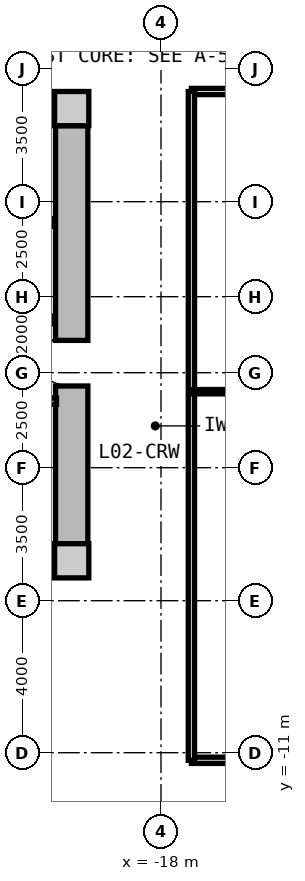
"""IFC4 building model, lengths in metres.
Left out: names, types, materials, properties, quantities, classifications, styles, units other than length and angle.
Written with IfcOpenShell. Run it as: python <this file> out.ifc"""

import sys

from ifc_helpers import new_model, si_unit, direction, frame, frame_2d, origin, origin_2d, place, context, subcontext, project, spatial, rectangle, extrude, source, transform, mapped, element, fill, save


model = new_model("IFC4")
c1 = context("Model", 3, precision=1e-05, world=origin(), true_north=direction((0.0, 1.0)))
c2 = subcontext(c1, "Body", "Model", "MODEL_VIEW")
j1 = project(units=[si_unit("LENGTHUNIT", "METRE"), si_unit("PLANEANGLEUNIT", "RADIAN")], contexts=[c1])
p1 = place(None, origin())
s1 = spatial("IfcSite", under=j1, at=p1, CompositionType="ELEMENT")
p2 = place(p1, origin())
s2 = spatial("IfcBuilding", under=s1, at=p2, CompositionType="ELEMENT")
p3 = place(p2, frame((0.0, 0.0, 8.4)))
s3 = spatial("IfcBuildingStorey", under=s2, at=p3, CompositionType="ELEMENT", Elevation=8.4)
m1 = source(origin(), c2, "Body", "SweptSolid", [
    extrude(rectangle(XDim=0.9, YDim=0.9, at=origin_2d()), origin(), (0.0, 0.0, 1.0), 4.2),
])
for number, where, z_axis, x_axis in (
    (1, (-20.35, -5.95, 0.0), (0.0, 0.0, 1.0), (1.0, 0.0, 0.0)),
    (2, (-20.35, 5.95, 0.0), (0.0, 0.0, 1.0), (1.0, 0.0, 0.0)),
):
    element("IfcColumn", number, at=place(p3, frame(where, z_axis=z_axis, x_axis=x_axis)), inside=s3, PredefinedType="COLUMN", context=c2, shape_type="MappedRepresentation", body=[
        mapped(m1, transform((0.0, 0.0, 0.0), x_axis=(1.0, 0.0, 0.0), y_axis=(0.0, 1.0, 0.0), z_axis=(0.0, 0.0, 1.0), scale=1.0)),
    ])
m2 = source(origin(), c2, "Body", "SweptSolid", [
    extrude(rectangle(XDim=14.4, YDim=0.85, at=frame_2d((7.2, 0.0))), origin(), (0.0, 0.0, 1.0), 3.88),
])
for number, where, z_axis, x_axis in (
    (3, (-35.2, 5.95, 0.0), (0.0, 0.0, 1.0), (1.0, 0.0, 0.0)),
    (4, (-20.8, -5.95, 0.0), (0.0, 0.0, 1.0), (-1.0, 0.0, 0.0)),
):
    element("IfcWall", number, at=place(p3, frame(where, z_axis=z_axis, x_axis=x_axis)), inside=s3, PredefinedType="SHEAR", context=c2, shape_type="MappedRepresentation", body=[
        mapped(m2, transform((0.0, 0.0, 0.0), x_axis=(1.0, 0.0, 0.0), y_axis=(0.0, 1.0, 0.0), z_axis=(0.0, 0.0, 1.0), scale=1.0)),
    ])
m3 = source(origin(), c2, "Body", "SweptSolid", [
    extrude(rectangle(XDim=11.0, YDim=0.85, at=frame_2d((5.5, 0.0))), origin(), (0.0, 0.0, 1.0), 3.88),
])
p4 = place(p3, frame((-20.35, 5.5, 0.0), z_axis=(0.0, 0.0, 1.0), x_axis=(0.0, -1.0, 0.0)))
e5 = element("IfcWall", 5, at=p4, inside=s3, PredefinedType="SHEAR", context=c2, shape_type="MappedRepresentation", body=[
    mapped(m3, transform((0.0, 0.0, 0.0), x_axis=(1.0, 0.0, 0.0), y_axis=(0.0, 1.0, 0.0), z_axis=(0.0, 0.0, 1.0), scale=1.0)),
])
p5 = place(p4, frame((5.65, 0.0, 0.0)))
e6 = element("IfcOpeningElement", 6, at=p5, cuts=e5, PredefinedType="OPENING", context=c2, shape_type="SweptSolid", body=[
    extrude(rectangle(XDim=1.2, YDim=2.15, at=frame_2d((0.6, 1.075))), frame((0.0, 0.435, 0.0), z_axis=(0.0, -1.0, 0.0), x_axis=(1.0, 0.0, 0.0)), (0.0, 0.0, 1.0), 0.87),
])
m4 = source(origin(), c2, "Body", "SweptSolid", [
    extrude(rectangle(XDim=3.2, YDim=0.2, at=frame_2d((1.6, 0.0))), origin(), (0.0, 0.0, 1.0), 3.865),
])
p6 = place(p3, frame((-24.0, 2.95, 0.0), z_axis=(0.0, 0.0, 1.0), x_axis=(1.0, 0.0, 0.0)))
e7 = element("IfcWall", 7, at=p6, inside=s3, PredefinedType="PARTITIONING", context=c2, shape_type="MappedRepresentation", body=[
    mapped(m4, transform((0.0, 0.0, 0.0), x_axis=(1.0, 0.0, 0.0), y_axis=(0.0, 1.0, 0.0), z_axis=(0.0, 0.0, 1.0), scale=1.0)),
])
m5 = source(origin(), c2, "Body", "SweptSolid", [
    extrude(rectangle(XDim=6.66, YDim=0.21, at=frame_2d((3.33, 0.0))), origin(), (0.0, 0.0, 1.0), 3.865),
])
p7 = place(p3, frame((-27.46, 0.39, 0.0), z_axis=(0.0, 0.0, 1.0), x_axis=(1.0, 0.0, 0.0)))
e8 = element("IfcWall", 8, at=p7, inside=s3, PredefinedType="PARTITIONING", context=c2, shape_type="MappedRepresentation", body=[
    mapped(m5, transform((0.0, 0.0, 0.0), x_axis=(1.0, 0.0, 0.0), y_axis=(0.0, 1.0, 0.0), z_axis=(0.0, 0.0, 1.0), scale=1.0)),
])
p8 = place(p7, frame((1.0, 0.0, 0.0)))
e9 = element("IfcOpeningElement", 9, at=p8, cuts=e8, PredefinedType="OPENING", context=c2, shape_type="SweptSolid", body=[
    extrude(rectangle(XDim=1.2, YDim=2.15, at=frame_2d((0.6, 1.075))), frame((0.0, 0.115, 0.0), z_axis=(0.0, -1.0, 0.0), x_axis=(1.0, 0.0, 0.0)), (0.0, 0.0, 1.0), 0.23),
])
m6 = source(origin(), c2, "Body", "SweptSolid", [
    extrude(rectangle(XDim=2.7, YDim=0.165, at=frame_2d((1.35, 0.0))), origin(), (0.0, 0.0, 1.0), 3.865),
])
p9 = place(p3, frame((-23.45, -1.75, 0.0), z_axis=(0.0, 0.0, 1.0), x_axis=(1.0, 0.0, 0.0)))
e10 = element("IfcWall", 10, at=p9, inside=s3, PredefinedType="PARTITIONING", context=c2, shape_type="MappedRepresentation", body=[
    mapped(m6, transform((0.0, 0.0, 0.0), x_axis=(1.0, 0.0, 0.0), y_axis=(0.0, 1.0, 0.0), z_axis=(0.0, 0.0, 1.0), scale=1.0)),
])
p10 = place(p9, frame((0.222, 0.0, 0.0)))
e11 = element("IfcOpeningElement", 11, at=p10, cuts=e10, PredefinedType="OPENING", context=c2, shape_type="SweptSolid", body=[
    extrude(rectangle(XDim=0.925, YDim=2.1, at=frame_2d((0.462, 1.05))), frame((0.0, 0.093, 0.0), z_axis=(0.0, -1.0, 0.0), x_axis=(1.0, 0.0, 0.0)), (0.0, 0.0, 1.0), 0.185),
])
p11 = place(p9, frame((1.522, 0.0, 0.0)))
e12 = element("IfcOpeningElement", 12, at=p11, cuts=e10, PredefinedType="OPENING", context=c2, shape_type="SweptSolid", body=[
    extrude(rectangle(XDim=0.925, YDim=2.1, at=frame_2d((0.462, 1.05))), frame((0.0, 0.093, 0.0), z_axis=(0.0, -1.0, 0.0), x_axis=(1.0, 0.0, 0.0)), (0.0, 0.0, 1.0), 0.185),
])
m7 = source(origin(), c2, "Body", "SweptSolid", [
    extrude(rectangle(XDim=34.4, YDim=0.165, at=frame_2d((17.2, 0.0))), origin(), (0.0, 0.0, 1.0), 3.865),
])
p12 = place(p3, frame((-17.2, -11.2, 0.0), z_axis=(0.0, 0.0, 1.0), x_axis=(1.0, 0.0, 0.0)))
e13 = element("IfcWall", 13, at=p12, inside=s3, PredefinedType="PARTITIONING", context=c2, shape_type="MappedRepresentation", body=[
    mapped(m7, transform((0.0, 0.0, 0.0), x_axis=(1.0, 0.0, 0.0), y_axis=(0.0, 1.0, 0.0), z_axis=(0.0, 0.0, 1.0), scale=1.0)),
])
p13 = place(p12, frame((4.2, 0.0, 0.0)))
e14 = element("IfcOpeningElement", 14, at=p13, cuts=e13, PredefinedType="OPENING", context=c2, shape_type="SweptSolid", body=[
    extrude(rectangle(XDim=1.25, YDim=2.2, at=frame_2d((0.625, 1.1))), frame((0.0, 0.093, 0.0), z_axis=(0.0, -1.0, 0.0), x_axis=(1.0, 0.0, 0.0)), (0.0, 0.0, 1.0), 0.185),
])
p14 = place(p12, frame((16.1, 0.0, 0.0)))
e15 = element("IfcOpeningElement", 15, at=p14, cuts=e13, PredefinedType="OPENING", context=c2, shape_type="SweptSolid", body=[
    extrude(rectangle(XDim=2.2, YDim=2.4, at=frame_2d((1.1, 1.2))), frame((0.0, 0.093, 0.0), z_axis=(0.0, -1.0, 0.0), x_axis=(1.0, 0.0, 0.0)), (0.0, 0.0, 1.0), 0.185),
])
p15 = place(p12, frame((27.5, 0.0, 0.0)))
e16 = element("IfcOpeningElement", 16, at=p15, cuts=e13, PredefinedType="OPENING", context=c2, shape_type="SweptSolid", body=[
    extrude(rectangle(XDim=1.25, YDim=2.2, at=frame_2d((0.625, 1.1))), frame((0.0, 0.093, 0.0), z_axis=(0.0, -1.0, 0.0), x_axis=(1.0, 0.0, 0.0)), (0.0, 0.0, 1.0), 0.185),
])
p16 = place(p3, frame((-17.2, 6.4, 0.0), z_axis=(0.0, 0.0, 1.0), x_axis=(1.0, 0.0, 0.0)))
e17 = element("IfcWall", 17, at=p16, inside=s3, PredefinedType="PARTITIONING", context=c2, shape_type="MappedRepresentation", body=[
    mapped(m7, transform((0.0, 0.0, 0.0), x_axis=(1.0, 0.0, 0.0), y_axis=(0.0, 1.0, 0.0), z_axis=(0.0, 0.0, 1.0), scale=1.0)),
])
p17 = place(p16, frame((4.2, 0.0, 0.0)))
e18 = element("IfcOpeningElement", 18, at=p17, cuts=e17, PredefinedType="OPENING", context=c2, shape_type="SweptSolid", body=[
    extrude(rectangle(XDim=1.25, YDim=2.2, at=frame_2d((0.625, 1.1))), frame((0.0, 0.093, 0.0), z_axis=(0.0, -1.0, 0.0), x_axis=(1.0, 0.0, 0.0)), (0.0, 0.0, 1.0), 0.185),
])
p18 = place(p16, frame((25.5, 0.0, 0.0)))
e19 = element("IfcOpeningElement", 19, at=p18, cuts=e17, PredefinedType="OPENING", context=c2, shape_type="SweptSolid", body=[
    extrude(rectangle(XDim=0.92, YDim=2.1, at=frame_2d((0.46, 1.05))), frame((0.0, 0.093, 0.0), z_axis=(0.0, -1.0, 0.0), x_axis=(1.0, 0.0, 0.0)), (0.0, 0.0, 1.0), 0.185),
])
p19 = place(p16, frame((31.0, 0.0, 0.0)))
e20 = element("IfcOpeningElement", 20, at=p19, cuts=e17, PredefinedType="OPENING", context=c2, shape_type="SweptSolid", body=[
    extrude(rectangle(XDim=0.92, YDim=2.1, at=frame_2d((0.46, 1.05))), frame((0.0, 0.093, 0.0), z_axis=(0.0, -1.0, 0.0), x_axis=(1.0, 0.0, 0.0)), (0.0, 0.0, 1.0), 0.185),
])
m8 = source(origin(), c2, "Body", "SweptSolid", [
    extrude(rectangle(XDim=17.6, YDim=0.165, at=frame_2d((8.8, 0.0))), origin(), (0.0, 0.0, 1.0), 3.865),
])
p20 = place(p3, frame((-17.2, -11.2, 0.0), z_axis=(0.0, 0.0, 1.0), x_axis=(0.0, 1.0, 0.0)))
e21 = element("IfcWall", 21, at=p20, inside=s3, PredefinedType="PARTITIONING", context=c2, shape_type="MappedRepresentation", body=[
    mapped(m8, transform((0.0, 0.0, 0.0), x_axis=(1.0, 0.0, 0.0), y_axis=(0.0, 1.0, 0.0), z_axis=(0.0, 0.0, 1.0), scale=1.0)),
])
m9 = source(origin(), c2, "Body", "SweptSolid", [
    extrude(rectangle(XDim=10.7, YDim=0.115, at=frame_2d((5.35, 0.0))), origin(), (0.0, 0.0, 1.0), 3.865),
])
p21 = place(p3, frame((-17.2, -1.5, 0.0), z_axis=(0.0, 0.0, 1.0), x_axis=(1.0, 0.0, 0.0)))
e22 = element("IfcWall", 22, at=p21, inside=s3, PredefinedType="PARTITIONING", context=c2, shape_type="MappedRepresentation", body=[
    mapped(m9, transform((0.0, 0.0, 0.0), x_axis=(1.0, 0.0, 0.0), y_axis=(0.0, 1.0, 0.0), z_axis=(0.0, 0.0, 1.0), scale=1.0)),
])
m10 = source(origin(), c2, "Body", "SweptSolid", [
    extrude(rectangle(XDim=1.2, YDim=2.15, at=frame_2d((0.6, 1.075))), frame((0.0, 0.025, 0.0), z_axis=(0.0, -1.0, 0.0), x_axis=(1.0, 0.0, 0.0)), (0.0, 0.0, 1.0), 0.05),
])
p22 = place(p5, frame((1.2, 0.0, 0.0), z_axis=(0.0, 0.0, 1.0), x_axis=(-1.0, 0.0, 0.0)))
e23 = element("IfcDoor", 23, at=p22, inside=s3, OperationType="SINGLE_SWING_RIGHT", PredefinedType="DOOR", context=c2, shape_type="MappedRepresentation", body=[
    mapped(m10, transform((0.0, 0.0, 0.0), x_axis=(1.0, 0.0, 0.0), y_axis=(0.0, 1.0, 0.0), z_axis=(0.0, 0.0, 1.0), scale=1.0)),
])
fill(e6, e23)
save(model, sys.argv[1])
